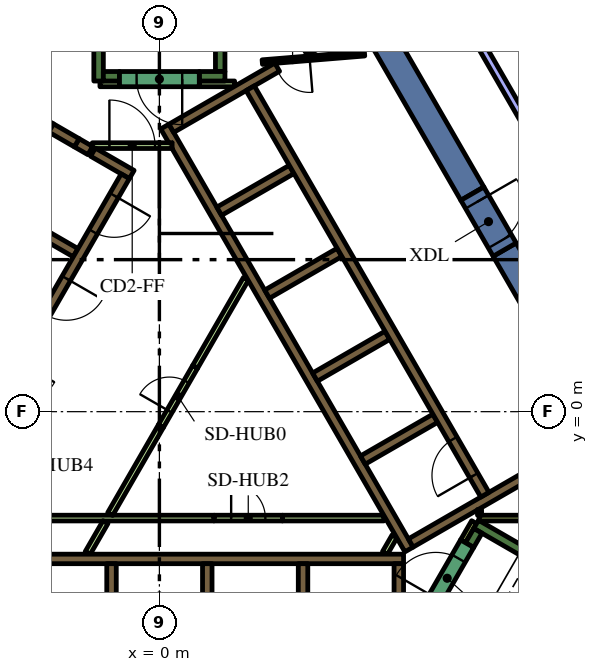
"""IFC4 building model, lengths in metres.
Left out: names, types, materials, properties, quantities, classifications, styles, units other than length and angle.
Written with IfcOpenShell. Run it as: python <this file> out.ifc"""

import sys

from ifc_helpers import new_model, si_unit, direction, frame, frame_2d, origin, place, context, subcontext, project, spatial, polyline, rectangle, outline, extrude, element, fill, save


model = new_model("IFC4")
c1 = context("Model", 3, precision=1e-05, world=origin(), true_north=direction((0.0, 1.0)))
c2 = subcontext(c1, "Body", "Model", "MODEL_VIEW")
j1 = project(units=[si_unit("LENGTHUNIT", "METRE"), si_unit("PLANEANGLEUNIT", "RADIAN")], contexts=[c1])
p1 = place(None, origin())
s1 = spatial("IfcSite", under=j1, at=p1, CompositionType="ELEMENT")
p2 = place(p1, origin())
s2 = spatial("IfcBuilding", under=s1, at=p2, CompositionType="ELEMENT")
p3 = place(p2, frame((0.0, 0.0, 210.0)))
s3 = spatial("IfcBuildingStorey", under=s2, at=p3, CompositionType="ELEMENT", Elevation=210.0)
for number, where, z_axis, x_axis in (
    (1, (9.085, 4.264, 0.0), (0.0, 0.0, 1.0), (0.5, -0.866, 0.0)),
    (2, (8.235, 5.736, 0.0), (0.0, 0.0, 1.0), (-0.5, 0.866, 0.0)),
):
    element("IfcWall", number, at=place(p3, frame(where, z_axis=z_axis, x_axis=x_axis)), inside=s3, PredefinedType="SOLIDWALL", context=c2, shape_type="SweptSolid", body=[
        extrude(rectangle(XDim=12.472, YDim=0.7, at=frame_2d((6.236, 0.0))), origin(), (0.0, 0.0, 1.0), 4.2),
    ])
p4 = place(p3, frame((8.334, -2.964, 0.0), z_axis=(0.0, 0.0, 1.0), x_axis=(0.866016039709, -0.500016218704, 0.0)))
e3 = element("IfcWall", 3, at=p4, inside=s3, PredefinedType="SOLIDWALL", context=c2, shape_type="SweptSolid", body=[
    extrude(rectangle(XDim=7.05, YDim=0.25, at=frame_2d((3.525, 0.0))), origin(), (0.0, 0.0, 1.0), 4.2),
])
p5 = place(p3, frame((8.163, -3.511, 0.0), z_axis=(0.0, 0.0, 1.0), x_axis=(0.500127794843, 0.865951608824, 0.0)))
e4 = element("IfcWall", 4, at=p5, inside=s3, PredefinedType="SOLIDWALL", context=c2, shape_type="SweptSolid", body=[
    extrude(rectangle(XDim=0.435, YDim=0.25, at=frame_2d((0.217, 0.0))), origin(), (0.0, 0.0, 1.0), 4.2),
])
p6 = place(p3, frame((1.6, 8.95, 0.0), z_axis=(0.0, 0.0, 1.0), x_axis=(0.0, 1.0, 0.0)))
e5 = element("IfcWall", 5, at=p6, inside=s3, PredefinedType="SOLIDWALL", context=c2, shape_type="SweptSolid", body=[
    extrude(rectangle(XDim=6.8, YDim=0.25, at=frame_2d((3.4, 0.0))), origin(), (0.0, 0.0, 1.0), 4.2),
])
p7 = place(p3, frame((1.05, 8.825, 0.0), z_axis=(0.0, 0.0, 1.0), x_axis=(1.0, 0.0, 0.0)))
e6 = element("IfcWall", 6, at=p7, inside=s3, PredefinedType="SOLIDWALL", context=c2, shape_type="SweptSolid", body=[
    extrude(rectangle(XDim=0.675, YDim=0.25, at=frame_2d((0.337, 0.0))), origin(), (0.0, 0.0, 1.0), 4.2),
])
p8 = place(p3, frame((-1.6, 8.7, 0.0), z_axis=(0.0, 0.0, 1.0), x_axis=(0.0, 1.0, 0.0)))
e7 = element("IfcWall", 7, at=p8, inside=s3, PredefinedType="SOLIDWALL", context=c2, shape_type="SweptSolid", body=[
    extrude(rectangle(XDim=7.05, YDim=0.25, at=frame_2d((3.525, 0.0))), origin(), (0.0, 0.0, 1.0), 4.2),
])
p9 = place(p3, frame((-1.475, 8.825, 0.0), z_axis=(0.0, 0.0, 1.0), x_axis=(1.0, 0.0, 0.0)))
e8 = element("IfcWall", 8, at=p9, inside=s3, PredefinedType="SOLIDWALL", context=c2, shape_type="SweptSolid", body=[
    extrude(rectangle(XDim=0.425, YDim=0.25, at=frame_2d((0.212, 0.0))), origin(), (0.0, 0.0, 1.0), 4.2),
])
p10 = place(p3, frame((-5.806, -3.875, 0.0), z_axis=(0.0, 0.0, 1.0), x_axis=(1.0, 0.0, 0.0)))
e9 = element("IfcWall", 9, at=p10, inside=s3, PredefinedType="SOLIDWALL", context=c2, shape_type="SweptSolid", body=[
    extrude(rectangle(XDim=12.231, YDim=0.25, at=frame_2d((6.116, 0.0))), origin(), (0.0, 0.0, 1.0), 4.2),
])
p11 = place(p3, frame((6.3, -7.24, 0.0), z_axis=(0.0, 0.0, 1.0), x_axis=(0.0, 1.0, 0.0)))
e10 = element("IfcWall", 10, at=p11, inside=s3, PredefinedType="SOLIDWALL", context=c2, shape_type="SweptSolid", body=[
    extrude(rectangle(XDim=3.24, YDim=0.25, at=frame_2d((1.62, 0.0))), origin(), (0.0, 0.0, 1.0), 4.2),
])
for number, where, z_axis, x_axis in (
    (11, (3.78, -4.0, 0.0), (0.0, 0.0, 1.0), (0.0, -1.0, 0.0)),
    (12, (1.26, -4.0, 0.0), (0.0, 0.0, 1.0), (0.0, -1.0, 0.0)),
    (13, (-1.26, -4.0, 0.0), (0.0, 0.0, 1.0), (0.0, -1.0, 0.0)),
):
    element("IfcWall", number, at=place(p3, frame(where, z_axis=z_axis, x_axis=x_axis)), inside=s3, PredefinedType="SOLIDWALL", context=c2, shape_type="SweptSolid", body=[
        extrude(rectangle(XDim=2.2, YDim=0.25, at=frame_2d((1.1, 0.0))), origin(), (0.0, 0.0, 1.0), 4.2),
    ])
p12 = place(p3, origin())
e14 = element("IfcWall", 14, at=p12, inside=s3, PredefinedType="SOLIDWALL", context=c2, shape_type="SweptSolid", body=[
    extrude(outline(polyline([(0.332, 6.925), (0.335, 6.925), (0.335, 6.925), (0.335, 6.925), (0.335, 7.075), (0.335, 7.075), (0.335, 7.075), (0.245, 7.075), (0.035, 7.439), (0.252, 7.564), (0.377, 7.348), (1.512, 5.382), (1.637, 5.165), (2.221, 4.153), (2.771, 3.199), (2.896, 2.983), (3.138, 2.564), (4.031, 1.017), (4.156, 0.801), (5.292, -1.165), (5.417, -1.382), (6.073, -2.519), (6.552, -3.348), (6.677, -3.564), (6.46, -3.689), (0.332, 6.925)])), origin(), (0.0, 0.0, 1.0), 4.2),
])
p13 = place(p3, frame((3.1, 9.064, 0.0), z_axis=(0.0, 0.0, 1.0), x_axis=(-0.866030133475, -0.499991807846, 0.0)))
e15 = element("IfcWall", 15, at=p13, inside=s3, PredefinedType="SOLIDWALL", context=c2, shape_type="SweptSolid", body=[
    extrude(rectangle(XDim=3.217, YDim=0.25, at=frame_2d((1.608, 0.0))), origin(), (0.0, 0.0, 1.0), 4.2),
])
p14 = place(p3, frame((1.574, 5.274, 0.0), z_axis=(0.0, 0.0, 1.0), x_axis=(0.866028486751, 0.499994660107, 0.0)))
e16 = element("IfcWall", 16, at=p14, inside=s3, PredefinedType="SOLIDWALL", context=c2, shape_type="SweptSolid", body=[
    extrude(rectangle(XDim=2.2, YDim=0.25, at=frame_2d((1.1, 0.0))), origin(), (0.0, 0.0, 1.0), 4.2),
])
for number, where, z_axis, x_axis in (
    (17, (2.834, 3.091, 0.0), (0.0, 0.0, 1.0), (0.866, 0.5, 0.0)),
    (18, (4.094, 0.909, 0.0), (0.0, 0.0, 1.0), (0.866, 0.5, 0.0)),
    (19, (5.354, -1.274, 0.0), (0.0, 0.0, 1.0), (0.866, 0.5, 0.0)),
):
    element("IfcWall", number, at=place(p3, frame(where, z_axis=z_axis, x_axis=x_axis)), inside=s3, PredefinedType="SOLIDWALL", context=c2, shape_type="SweptSolid", body=[
        extrude(rectangle(XDim=2.2, YDim=0.25, at=frame_2d((1.1, 0.0))), origin(), (0.0, 0.0, 1.0), 4.2),
    ])
p15 = place(p3, frame((11.507, -0.631, 0.0), z_axis=(0.0, 0.0, 1.0), x_axis=(-0.866011447264, -0.500024172624, 0.0)))
e20 = element("IfcWall", 20, at=p15, inside=s3, PredefinedType="SOLIDWALL", context=c2, shape_type="SweptSolid", body=[
    extrude(rectangle(XDim=5.65, YDim=0.25, at=frame_2d((2.825, 0.0))), origin(), (0.0, 0.0, 1.0), 4.2),
])
p16 = place(p3, frame((3.83, 9.486, 0.0), z_axis=(0.0, 0.0, 1.0), x_axis=(0.865986202621, 0.500067892261, 0.0)))
e21 = element("IfcWall", 21, at=p16, inside=s3, PredefinedType="SOLIDWALL", context=c2, shape_type="SweptSolid", body=[
    extrude(rectangle(XDim=1.591, YDim=0.25, at=frame_2d((0.795, 0.0))), origin(), (0.0, 0.0, 1.0), 4.2),
])
p17 = place(p3, frame((-8.06, -1.311, 0.0), z_axis=(0.0, 0.0, 1.0), x_axis=(0.50000273126, 0.866023826885, 0.0)))
e22 = element("IfcWall", 22, at=p17, inside=s3, PredefinedType="SOLIDWALL", context=c2, shape_type="SweptSolid", body=[
    extrude(rectangle(XDim=10.33, YDim=0.25, at=frame_2d((5.165, 0.0))), origin(), (0.0, 0.0, 1.0), 4.2),
])
p18 = place(p3, frame((-1.819, 6.87, 0.0), z_axis=(0.0, 0.0, 1.0), x_axis=(-0.866294599386, 0.499533449405, 0.0)))
e23 = element("IfcWall", 23, at=p18, inside=s3, PredefinedType="SOLIDWALL", context=c2, shape_type="SweptSolid", body=[
    extrude(rectangle(XDim=0.41, YDim=0.25, at=frame_2d((0.205, 0.0))), origin(), (0.0, 0.0, 1.0), 4.2),
])
p19 = place(p3, frame((-2.849, 7.465, 0.0), z_axis=(0.0, 0.0, 1.0), x_axis=(0.865955664968, -0.500120771724, 0.0)))
e24 = element("IfcWall", 24, at=p19, inside=s3, PredefinedType="SOLIDWALL", context=c2, shape_type="SweptSolid", body=[
    extrude(rectangle(XDim=0.778, YDim=0.25, at=frame_2d((0.389, 0.0))), origin(), (0.0, 0.0, 1.0), 4.2),
])
p20 = place(p3, frame((-0.728, 6.24, 0.0), z_axis=(0.0, 0.0, 1.0), x_axis=(-0.866002680491, 0.500039355833, 0.0)))
e25 = element("IfcWall", 25, at=p20, inside=s3, PredefinedType="SOLIDWALL", context=c2, shape_type="SweptSolid", body=[
    extrude(rectangle(XDim=1.178, YDim=0.25, at=frame_2d((0.589, 0.0))), origin(), (0.0, 0.0, 1.0), 4.2),
])
p21 = place(p3, frame((-2.204, 4.182, 0.0), z_axis=(0.0, 0.0, 1.0), x_axis=(-0.866008176907, 0.50002983664, 0.0)))
e26 = element("IfcWall", 26, at=p21, inside=s3, PredefinedType="SOLIDWALL", context=c2, shape_type="SweptSolid", body=[
    extrude(rectangle(XDim=2.2, YDim=0.25, at=frame_2d((1.1, 0.0))), origin(), (0.0, 0.0, 1.0), 4.2),
])
p22 = place(p3, frame((0.941, 1.179, 0.0), z_axis=(0.0, 0.0, 1.0), x_axis=(0.499962406319, 0.866047107418, 0.0)))
e27 = element("IfcWall", 27, at=p22, inside=s3, PredefinedType="PARTITIONING", context=c2, shape_type="SweptSolid", body=[
    extrude(rectangle(XDim=2.672, YDim=0.15, at=frame_2d((1.336, 0.0))), origin(), (0.0, 0.0, 1.0), 3.45),
])
p23 = place(p3, frame((1.438, -2.8, 0.0), z_axis=(0.0, 0.0, 1.0), x_axis=(-1.0, 0.0, 0.0)))
e28 = element("IfcWall", 28, at=p23, inside=s3, PredefinedType="PARTITIONING", context=c2, shape_type="SweptSolid", body=[
    extrude(rectangle(XDim=7.781, YDim=0.15, at=frame_2d((3.891, 0.0))), origin(), (0.0, 0.0, 1.0), 3.45),
])
p24 = place(p3, frame((-1.418, -2.907, 0.0), z_axis=(0.0, 0.0, 1.0), x_axis=(-0.499978056798, -0.866038072327, 0.0)))
e29 = element("IfcWall", 29, at=p24, inside=s3, PredefinedType="PARTITIONING", context=c2, shape_type="SweptSolid", body=[
    extrude(rectangle(XDim=0.937, YDim=0.15, at=frame_2d((0.469, 0.0))), origin(), (0.0, 0.0, 1.0), 3.45),
])
for number, where, z_axis, x_axis in (
    (30, (-1.295, -2.693, 0.0), (0.0, 0.0, 1.0), (0.5, 0.866, 0.0)),
    (31, (3.238, -2.8, 0.0), (0.0, 0.0, 1.0), (1.0, 0.0, 0.0)),
):
    element("IfcWall", number, at=place(p3, frame(where, z_axis=z_axis, x_axis=x_axis)), inside=s3, PredefinedType="PARTITIONING", context=c2, shape_type="SweptSolid", body=[
        extrude(rectangle(XDim=2.672, YDim=0.15, at=frame_2d((1.336, 0.0))), origin(), (0.0, 0.0, 1.0), 3.45),
    ])
p25 = place(p3, frame((1.05, 8.625, 0.0), z_axis=(0.0, 0.0, 1.0), x_axis=(1.0, 0.0, 0.0)))
e32 = element("IfcWall", 32, at=p25, inside=s3, PredefinedType="PARTITIONING", context=c2, shape_type="SweptSolid", body=[
    extrude(rectangle(XDim=0.929, YDim=0.15, at=frame_2d((0.464, 0.0))), origin(), (0.0, 0.0, 1.0), 3.45),
])
p26 = place(p3, frame((-1.564, 8.625, 0.0), z_axis=(0.0, 0.0, 1.0), x_axis=(1.0, 0.0, 0.0)))
e33 = element("IfcWall", 33, at=p26, inside=s3, PredefinedType="PARTITIONING", context=c2, shape_type="SweptSolid", body=[
    extrude(rectangle(XDim=0.514, YDim=0.15, at=frame_2d((0.257, 0.0))), origin(), (0.0, 0.0, 1.0), 3.45),
])
p27 = place(p3, frame((8.412, -2.8, 0.0), z_axis=(0.0, 0.0, 1.0), x_axis=(1.0, 0.0, 0.0)))
e34 = element("IfcWall", 34, at=p27, inside=s3, PredefinedType="PARTITIONING", context=c2, shape_type="SweptSolid", body=[
    extrude(rectangle(XDim=1.288, YDim=0.15, at=frame_2d((0.644, 0.0))), origin(), (0.0, 0.0, 1.0), 4.2),
])
p28 = place(p3, frame((8.37, -2.65, 0.0), z_axis=(0.0, 0.0, 1.0), x_axis=(1.0, 0.0, 0.0)))
e35 = element("IfcWall", 35, at=p28, inside=s3, PredefinedType="PARTITIONING", context=c2, shape_type="SweptSolid", body=[
    extrude(rectangle(XDim=0.108, YDim=0.15, at=frame_2d((0.054, 0.0))), origin(), (0.0, 0.0, 1.0), 4.2),
])
p29 = place(p3, frame((8.281, -2.907, 0.0), z_axis=(0.0, 0.0, 1.0), x_axis=(-0.500193841991, -0.86591346013, 0.0)))
e36 = element("IfcWall", 36, at=p29, inside=s3, PredefinedType="PARTITIONING", context=c2, shape_type="SweptSolid", body=[
    extrude(rectangle(XDim=0.583, YDim=0.15, at=frame_2d((0.292, 0.0))), origin(), (0.0, 0.0, 1.0), 4.2),
])
p30 = place(p3, frame((5.936, -3.718, 0.0), z_axis=(0.0, 0.0, 1.0), x_axis=(0.499890179513, 0.866088799389, 0.0)))
e37 = element("IfcWall", 37, at=p30, inside=s3, PredefinedType="PARTITIONING", context=c2, shape_type="SweptSolid", body=[
    extrude(rectangle(XDim=0.504, YDim=0.15, at=frame_2d((0.252, 0.0))), origin(), (0.0, 0.0, 1.0), 3.45),
])
p31 = place(p3, frame((8.565, -2.185, 0.0), z_axis=(0.0, 0.0, 1.0), x_axis=(-0.499997954832, 0.866026584559, 0.0)))
e38 = element("IfcWall", 38, at=p31, inside=s3, PredefinedType="SOLIDWALL", context=c2, shape_type="SweptSolid", body=[
    extrude(rectangle(XDim=12.35, YDim=0.25, at=frame_2d((6.175, 0.0))), origin(), (0.0, 0.0, 1.0), 4.2),
])
p32 = place(p31, frame((0.585, 0.0, 0.0)))
e39 = element("IfcOpeningElement", 39, at=p32, cuts=e38, PredefinedType="OPENING", context=c2, shape_type="SweptSolid", body=[
    extrude(rectangle(XDim=1.1, YDim=2.1, at=frame_2d((0.55, 1.05))), frame((0.0, 0.135, 0.0), z_axis=(0.0, -1.0, 0.0), x_axis=(1.0, 0.0, 0.0)), (0.0, 0.0, 1.0), 0.27),
])
p33 = place(p3, frame((-0.898, 6.194, 0.0), z_axis=(0.0, 0.0, 1.0), x_axis=(-0.499996202215, -0.866027596426, 0.0)))
e40 = element("IfcWall", 40, at=p33, inside=s3, PredefinedType="SOLIDWALL", context=c2, shape_type="SweptSolid", body=[
    extrude(rectangle(XDim=9.83, YDim=0.25, at=frame_2d((4.915, 0.0))), origin(), (0.0, 0.0, 1.0), 4.2),
])
p34 = place(p33, frame((0.585, 0.0, 0.0)))
e41 = element("IfcOpeningElement", 41, at=p34, cuts=e40, PredefinedType="OPENING", context=c2, shape_type="SweptSolid", body=[
    extrude(rectangle(XDim=1.1, YDim=2.1, at=frame_2d((0.55, 1.05))), frame((0.0, 0.135, 0.0), z_axis=(0.0, -1.0, 0.0), x_axis=(1.0, 0.0, 0.0)), (0.0, 0.0, 1.0), 0.27),
])
p35 = place(p33, frame((3.105, 0.0, 0.0)))
e42 = element("IfcOpeningElement", 42, at=p35, cuts=e40, PredefinedType="OPENING", context=c2, shape_type="SweptSolid", body=[
    extrude(rectangle(XDim=1.1, YDim=2.1, at=frame_2d((0.55, 1.05))), frame((0.0, 0.135, 0.0), z_axis=(0.0, -1.0, 0.0), x_axis=(1.0, 0.0, 0.0)), (0.0, 0.0, 1.0), 0.27),
])
p36 = place(p33, frame((5.625, 0.0, 0.0)))
e43 = element("IfcOpeningElement", 43, at=p36, cuts=e40, PredefinedType="OPENING", context=c2, shape_type="SweptSolid", body=[
    extrude(rectangle(XDim=1.1, YDim=2.1, at=frame_2d((0.55, 1.05))), frame((0.0, 0.135, 0.0), z_axis=(0.0, -1.0, 0.0), x_axis=(1.0, 0.0, 0.0)), (0.0, 0.0, 1.0), 0.27),
])
p37 = place(p33, frame((8.145, 0.0, 0.0)))
e44 = element("IfcOpeningElement", 44, at=p37, cuts=e40, PredefinedType="OPENING", context=c2, shape_type="SweptSolid", body=[
    extrude(rectangle(XDim=1.1, YDim=2.1, at=frame_2d((0.55, 1.05))), frame((0.0, 0.135, 0.0), z_axis=(0.0, -1.0, 0.0), x_axis=(1.0, 0.0, 0.0)), (0.0, 0.0, 1.0), 0.27),
])
p38 = place(p3, frame((7.048, -5.292, 0.0), z_axis=(0.0, 0.0, 1.0), x_axis=(0.49994051562, 0.866059744384, 0.0)))
e45 = element("IfcWall", 45, at=p38, inside=s3, PredefinedType="SOLIDWALL", context=c2, shape_type="SweptSolid", body=[
    extrude(rectangle(XDim=2.1, YDim=0.4, at=frame_2d((1.05, 0.0))), origin(), (0.0, 0.0, 1.0), 4.2),
])
p39 = place(p38, frame((0.45, 0.0, 0.0)))
e46 = element("IfcOpeningElement", 46, at=p39, cuts=e45, PredefinedType="OPENING", context=c2, shape_type="SweptSolid", body=[
    extrude(rectangle(XDim=1.2, YDim=2.1, at=frame_2d((0.6, 1.05))), frame((0.0, 0.21, 0.0), z_axis=(0.0, -1.0, 0.0), x_axis=(1.0, 0.0, 0.0)), (0.0, 0.0, 1.0), 0.42),
])
p40 = place(p3, frame((1.05, 8.75, 0.0), z_axis=(0.0, 0.0, 1.0), x_axis=(-1.0, 0.0, 0.0)))
e47 = element("IfcWall", 47, at=p40, inside=s3, PredefinedType="SOLIDWALL", context=c2, shape_type="SweptSolid", body=[
    extrude(rectangle(XDim=2.1, YDim=0.4, at=frame_2d((1.05, 0.0))), origin(), (0.0, 0.0, 1.0), 4.2),
])
p41 = place(p40, frame((0.45, 0.0, 0.0)))
e48 = element("IfcOpeningElement", 48, at=p41, cuts=e47, PredefinedType="OPENING", context=c2, shape_type="SweptSolid", body=[
    extrude(rectangle(XDim=1.2, YDim=2.1, at=frame_2d((0.6, 1.05))), frame((0.0, 0.21, 0.0), z_axis=(0.0, -1.0, 0.0), x_axis=(1.0, 0.0, 0.0)), (0.0, 0.0, 1.0), 0.42),
])
p42 = place(p3, frame((5.398, 9.419, 0.0), z_axis=(0.0, 0.0, 1.0), x_axis=(-0.996653416376, -0.081743303248, 0.0)))
e49 = element("IfcWall", 49, at=p42, inside=s3, PredefinedType="PARTITIONING", context=c2, shape_type="SweptSolid", body=[
    extrude(rectangle(XDim=2.7, YDim=0.12, at=frame_2d((1.35, 0.0))), origin(), (0.0, 0.0, 1.0), 3.45),
])
p43 = place(p42, frame((1.45, 0.0, 0.0)))
e50 = element("IfcOpeningElement", 50, at=p43, cuts=e49, PredefinedType="OPENING", context=c2, shape_type="SweptSolid", body=[
    extrude(rectangle(XDim=0.9, YDim=2.1, at=frame_2d((0.45, 1.05))), frame((0.0, 0.07, 0.0), z_axis=(0.0, -1.0, 0.0), x_axis=(1.0, 0.0, 0.0)), (0.0, 0.0, 1.0), 0.14),
])
p44 = place(p3, frame((-1.765, 7.0, 0.0), z_axis=(0.0, 0.0, 1.0), x_axis=(1.0, 0.0, 0.0)))
e51 = element("IfcWall", 51, at=p44, inside=s3, PredefinedType="PARTITIONING", context=c2, shape_type="SweptSolid", body=[
    extrude(rectangle(XDim=2.1, YDim=0.15, at=frame_2d((1.05, 0.0))), origin(), (0.0, 0.0, 1.0), 3.45),
])
p45 = place(p44, frame((0.45, 0.0, 0.0)))
e52 = element("IfcOpeningElement", 52, at=p45, cuts=e51, PredefinedType="OPENING", context=c2, shape_type="SweptSolid", body=[
    extrude(rectangle(XDim=1.2, YDim=2.1, at=frame_2d((0.6, 1.05))), frame((0.0, 0.085, 0.0), z_axis=(0.0, -1.0, 0.0), x_axis=(1.0, 0.0, 0.0)), (0.0, 0.0, 1.0), 0.17),
])
p46 = place(p3, frame((8.235, 5.736, 0.0), z_axis=(0.0, 0.0, 1.0), x_axis=(0.499954529098, -0.86605165483, 0.0)))
e53 = element("IfcWall", 53, at=p46, inside=s3, PredefinedType="SOLIDWALL", context=c2, shape_type="SweptSolid", body=[
    extrude(rectangle(XDim=1.7, YDim=0.7, at=frame_2d((0.85, 0.0))), origin(), (0.0, 0.0, 1.0), 4.2),
])
p47 = place(p46, frame((0.25, 0.0, 0.0)))
e54 = element("IfcOpeningElement", 54, at=p47, cuts=e53, PredefinedType="OPENING", context=c2, shape_type="SweptSolid", body=[
    extrude(rectangle(XDim=1.2, YDim=2.1, at=frame_2d((0.6, 1.05))), frame((0.0, 0.36, 0.0), z_axis=(0.0, -1.0, 0.0), x_axis=(1.0, 0.0, 0.0)), (0.0, 0.0, 1.0), 0.72),
])
p48 = place(p3, frame((0.041, -0.379, 0.0), z_axis=(0.0, 0.0, 1.0), x_axis=(0.499961193289, 0.866047807691, 0.0)))
e55 = element("IfcWall", 55, at=p48, inside=s3, PredefinedType="PARTITIONING", context=c2, shape_type="SweptSolid", body=[
    extrude(rectangle(XDim=1.8, YDim=0.15, at=frame_2d((0.9, 0.0))), origin(), (0.0, 0.0, 1.0), 3.45),
])
p49 = place(p48, frame((0.45, 0.0, 0.0)))
e56 = element("IfcOpeningElement", 56, at=p49, cuts=e55, PredefinedType="OPENING", context=c2, shape_type="SweptSolid", body=[
    extrude(rectangle(XDim=0.9, YDim=2.1, at=frame_2d((0.45, 1.05))), frame((0.0, 0.085, 0.0), z_axis=(0.0, -1.0, 0.0), x_axis=(1.0, 0.0, 0.0)), (0.0, 0.0, 1.0), 0.17),
])
p50 = place(p3, frame((1.438, -2.8, 0.0), z_axis=(0.0, 0.0, 1.0), x_axis=(1.0, 0.0, 0.0)))
e57 = element("IfcWall", 57, at=p50, inside=s3, PredefinedType="PARTITIONING", context=c2, shape_type="SweptSolid", body=[
    extrude(rectangle(XDim=1.8, YDim=0.15, at=frame_2d((0.9, 0.0))), origin(), (0.0, 0.0, 1.0), 3.45),
])
p51 = place(p50, frame((0.45, 0.0, 0.0)))
e58 = element("IfcOpeningElement", 58, at=p51, cuts=e57, PredefinedType="OPENING", context=c2, shape_type="SweptSolid", body=[
    extrude(rectangle(XDim=0.9, YDim=2.1, at=frame_2d((0.45, 1.05))), frame((0.0, 0.085, 0.0), z_axis=(0.0, -1.0, 0.0), x_axis=(1.0, 0.0, 0.0)), (0.0, 0.0, 1.0), 0.17),
])
p52 = place(p3, frame((12.772, 2.178, 0.0), z_axis=(0.0, 0.0, 1.0), x_axis=(-0.5000018851, 0.866024315419, 0.0)))
e59 = element("IfcWall", 59, at=p52, inside=s3, PredefinedType="PARTITIONING", context=c2, shape_type="SweptSolid", body=[
    extrude(rectangle(XDim=9.0, YDim=0.2, at=frame_2d((4.5, 0.0))), origin(), (0.0, 0.0, 1.0), 3.45),
])
p53 = place(p32, origin())
e60 = element("IfcDoor", 60, at=p53, inside=s3, OperationType="DOUBLE_DOOR_SLIDING", PredefinedType="DOOR", context=c2, shape_type="SweptSolid", body=[
    extrude(rectangle(XDim=1.1, YDim=2.1, at=frame_2d((0.55, 1.05))), frame((0.0, 0.025, 0.0), z_axis=(0.0, -1.0, 0.0), x_axis=(1.0, 0.0, 0.0)), (0.0, 0.0, 1.0), 0.05),
])
fill(e39, e60)
p54 = place(p34, origin())
e61 = element("IfcDoor", 61, at=p54, inside=s3, OperationType="DOUBLE_DOOR_SLIDING", PredefinedType="DOOR", context=c2, shape_type="SweptSolid", body=[
    extrude(rectangle(XDim=1.1, YDim=2.1, at=frame_2d((0.55, 1.05))), frame((0.0, 0.025, 0.0), z_axis=(0.0, -1.0, 0.0), x_axis=(1.0, 0.0, 0.0)), (0.0, 0.0, 1.0), 0.05),
])
fill(e41, e61)
p55 = place(p35, origin())
e62 = element("IfcDoor", 62, at=p55, inside=s3, OperationType="DOUBLE_DOOR_SLIDING", PredefinedType="DOOR", context=c2, shape_type="SweptSolid", body=[
    extrude(rectangle(XDim=1.1, YDim=2.1, at=frame_2d((0.55, 1.05))), frame((0.0, 0.025, 0.0), z_axis=(0.0, -1.0, 0.0), x_axis=(1.0, 0.0, 0.0)), (0.0, 0.0, 1.0), 0.05),
])
fill(e42, e62)
p56 = place(p39, origin())
e63 = element("IfcDoor", 63, at=p56, inside=s3, OperationType="SINGLE_SWING_LEFT", PredefinedType="DOOR", context=c2, shape_type="SweptSolid", body=[
    extrude(rectangle(XDim=1.2, YDim=2.1, at=frame_2d((0.6, 1.05))), frame((0.0, 0.025, 0.0), z_axis=(0.0, -1.0, 0.0), x_axis=(1.0, 0.0, 0.0)), (0.0, 0.0, 1.0), 0.05),
])
fill(e46, e63)
p57 = place(p41, origin())
e64 = element("IfcDoor", 64, at=p57, inside=s3, OperationType="SINGLE_SWING_LEFT", PredefinedType="DOOR", context=c2, shape_type="SweptSolid", body=[
    extrude(rectangle(XDim=1.2, YDim=2.1, at=frame_2d((0.6, 1.05))), frame((0.0, 0.025, 0.0), z_axis=(0.0, -1.0, 0.0), x_axis=(1.0, 0.0, 0.0)), (0.0, 0.0, 1.0), 0.05),
])
fill(e48, e64)
p58 = place(p43, origin())
e65 = element("IfcDoor", 65, at=p58, inside=s3, OperationType="SINGLE_SWING_LEFT", PredefinedType="DOOR", context=c2, shape_type="SweptSolid", body=[
    extrude(rectangle(XDim=0.9, YDim=2.1, at=frame_2d((0.45, 1.05))), frame((0.0, 0.025, 0.0), z_axis=(0.0, -1.0, 0.0), x_axis=(1.0, 0.0, 0.0)), (0.0, 0.0, 1.0), 0.05),
])
fill(e50, e65)
p59 = place(p45, origin())
e66 = element("IfcDoor", 66, at=p59, inside=s3, OperationType="SINGLE_SWING_LEFT", PredefinedType="DOOR", context=c2, shape_type="SweptSolid", body=[
    extrude(rectangle(XDim=1.2, YDim=2.1, at=frame_2d((0.6, 1.05))), frame((0.0, 0.025, 0.0), z_axis=(0.0, -1.0, 0.0), x_axis=(1.0, 0.0, 0.0)), (0.0, 0.0, 1.0), 0.05),
])
fill(e52, e66)
p60 = place(p47, origin())
e67 = element("IfcDoor", 67, at=p60, inside=s3, OperationType="SINGLE_SWING_LEFT", PredefinedType="DOOR", context=c2, shape_type="SweptSolid", body=[
    extrude(rectangle(XDim=1.2, YDim=2.1, at=frame_2d((0.6, 1.05))), frame((0.0, 0.025, 0.0), z_axis=(0.0, -1.0, 0.0), x_axis=(1.0, 0.0, 0.0)), (0.0, 0.0, 1.0), 0.05),
])
fill(e54, e67)
p61 = place(p49, origin())
e68 = element("IfcDoor", 68, at=p61, inside=s3, OperationType="SINGLE_SWING_LEFT", PredefinedType="DOOR", context=c2, shape_type="SweptSolid", body=[
    extrude(rectangle(XDim=0.9, YDim=2.1, at=frame_2d((0.45, 1.05))), frame((0.0, 0.025, 0.0), z_axis=(0.0, -1.0, 0.0), x_axis=(1.0, 0.0, 0.0)), (0.0, 0.0, 1.0), 0.05),
])
fill(e56, e68)
p62 = place(p51, origin())
e69 = element("IfcDoor", 69, at=p62, inside=s3, OperationType="SINGLE_SWING_LEFT", PredefinedType="DOOR", context=c2, shape_type="SweptSolid", body=[
    extrude(rectangle(XDim=0.9, YDim=2.1, at=frame_2d((0.45, 1.05))), frame((0.0, 0.025, 0.0), z_axis=(0.0, -1.0, 0.0), x_axis=(1.0, 0.0, 0.0)), (0.0, 0.0, 1.0), 0.05),
])
fill(e58, e69)
save(model, sys.argv[1])
